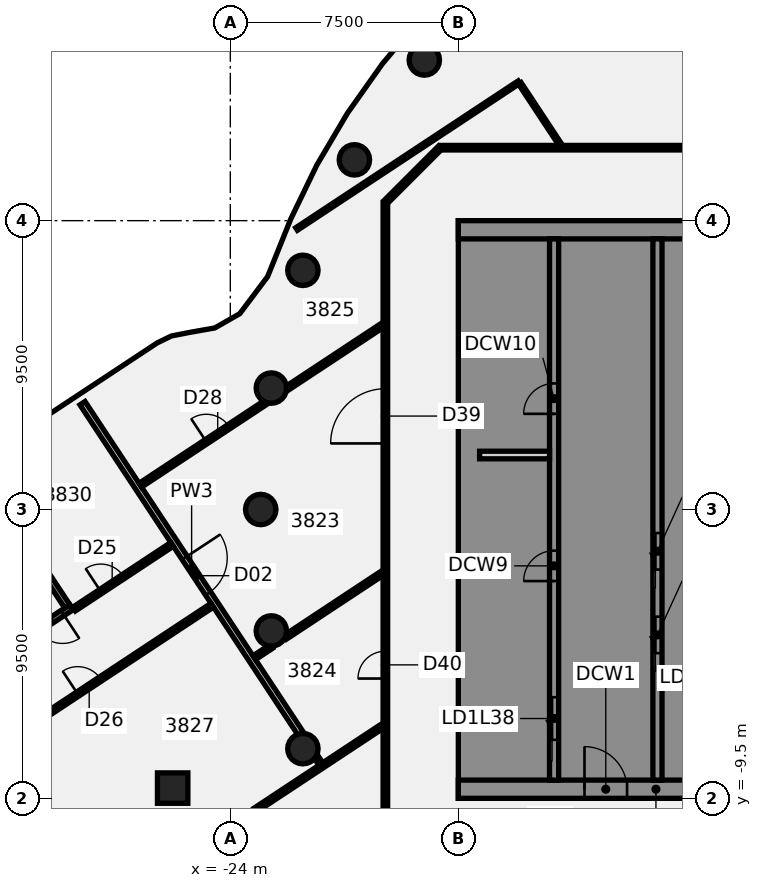
"""IFC4 building model, lengths in metres.
Left out: names, types, materials, properties, quantities, classifications, styles, units other than length and angle.
Written with IfcOpenShell. Run it as: python <this file> out.ifc"""

import sys

from ifc_helpers import new_model, si_unit, direction, frame, frame_2d, origin, origin_2d, place, context, subcontext, project, spatial, polyline, rectangle, circle, outline, extrude, element, fill, save


model = new_model("IFC4")
c1 = context("Model", 3, precision=1e-05, world=origin(), true_north=direction((0.0, 1.0)))
c2 = subcontext(c1, "Body", "Model", "MODEL_VIEW")
j1 = project(units=[si_unit("LENGTHUNIT", "METRE"), si_unit("PLANEANGLEUNIT", "RADIAN")], contexts=[c1])
p1 = place(None, origin())
s1 = spatial("IfcSite", under=j1, at=p1, CompositionType="ELEMENT")
p2 = place(p1, origin())
s2 = spatial("IfcBuilding", under=s1, at=p2, CompositionType="ELEMENT")
p3 = place(p2, frame((0.0, 0.0, 155.5)))
s3 = spatial("IfcBuildingStorey", under=s2, at=p3, CompositionType="ELEMENT", Elevation=155.5)
for number, where, z_axis, x_axis in (
    (1, (-17.619, 14.784, -0.14), (0.0, 0.0, 1.0), (1.0, 0.0, 0.0)),
    (2, (-19.919, 11.5, -0.14), (0.0, 0.0, 1.0), (1.0, 0.0, 0.0)),
    (3, (-21.613, 7.866, -0.14), (0.0, 0.0, 1.0), (1.0, 0.0, 0.0)),
    (4, (-22.651, 3.994, -0.14), (0.0, 0.0, 1.0), (1.0, 0.0, 0.0)),
    (5, (-23.0, 0.0, -0.14), (0.0, 0.0, 1.0), (1.0, 0.0, 0.0)),
    (6, (-22.651, -3.994, -0.14), (0.0, 0.0, 1.0), (1.0, 0.0, 0.0)),
    (7, (-21.613, -7.866, -0.14), (0.0, 0.0, 1.0), (1.0, 0.0, 0.0)),
):
    element("IfcColumn", number, at=place(p3, frame(where, z_axis=z_axis, x_axis=x_axis)), inside=s3, PredefinedType="COLUMN", context=c2, shape_type="SweptSolid", body=[
        extrude(circle(Radius=0.5, at=origin_2d()), origin(), (0.0, 0.0, 1.0), 3.75),
    ])
p4 = place(p3, frame((-25.896, -9.163, -0.139), z_axis=(0.044706213481, -0.018481171221, 0.998829215025), x_axis=(-0.55085630211, 0.833637157717, 0.040080215802)))
e8 = element("IfcColumn", 8, at=p4, inside=s3, PredefinedType="COLUMN", context=c2, shape_type="SweptSolid", body=[
    extrude(rectangle(XDim=1.0, YDim=1.0, at=origin_2d()), origin(), (0.0, 0.0, 1.0), 3.752),
])
p5 = place(p3, frame((-28.862, 3.497, 0.0), z_axis=(0.0, 0.0, 1.0), x_axis=(0.551049471112, -0.834472576174, 0.0)))
e9 = element("IfcWall", 9, at=p5, inside=s3, PredefinedType="PARTITIONING", context=c2, shape_type="SweptSolid", body=[
    extrude(rectangle(XDim=13.029, YDim=0.2, at=frame_2d((6.514, 0.0))), origin(), (0.0, 0.0, 1.0), 3.01),
])
p6 = place(p5, frame((6.099, 0.0, 0.0)))
e10 = element("IfcOpeningElement", 10, at=p6, cuts=e9, PredefinedType="OPENING", context=c2, shape_type="SweptSolid", body=[
    extrude(rectangle(XDim=1.4, YDim=2.1, at=frame_2d((0.7, 1.05))), frame((0.0, 0.11, 0.0), z_axis=(0.0, -1.0, 0.0), x_axis=(1.0, 0.0, 0.0)), (0.0, 0.0, 1.0), 0.22),
])
p7 = place(p3, frame((-21.183, -8.133, 0.0), z_axis=(0.0, 0.0, 1.0), x_axis=(0.550902449234, -0.834569644444, 0.0)))
e11 = element("IfcWall", 11, at=p7, inside=s3, PredefinedType="PARTITIONING", context=c2, shape_type="SweptSolid", body=[
    extrude(rectangle(XDim=0.282, YDim=0.15, at=frame_2d((0.141, 0.0))), origin(), (0.0, 0.0, 1.0), 3.01),
])
p8 = place(p3, frame((-14.477, 14.014, 0.0), z_axis=(0.0, 0.0, 1.0), x_axis=(0.550874353815, -0.834588189653, 0.0)))
e12 = element("IfcWall", 12, at=p8, inside=s3, PredefinedType="PARTITIONING", context=c2, shape_type="SweptSolid", body=[
    extrude(rectangle(XDim=2.434, YDim=0.1, at=frame_2d((1.217, 0.0))), origin(), (0.0, 0.0, 1.0), 3.01),
])
p9 = place(p3, frame((-9.884, 23.177, 0.0), z_axis=(0.0, 0.0, 1.0), x_axis=(0.550963337995, -0.834529448363, 0.0)))
e13 = element("IfcWall", 13, at=p9, inside=s3, PredefinedType="PARTITIONING", context=c2, shape_type="SweptSolid", body=[
    extrude(rectangle(XDim=13.393, YDim=0.15, at=frame_2d((6.697, 0.0))), origin(), (0.0, 0.0, 1.0), 3.01),
])
p10 = place(p3, frame((-17.065, 11.9, 0.0), z_axis=(0.0, 0.0, 1.0), x_axis=(1.0, 0.0, 0.0)))
e14 = element("IfcWall", 14, at=p10, inside=s3, PredefinedType="PARTITIONING", context=c2, shape_type="SweptSolid", body=[
    extrude(rectangle(XDim=34.165, YDim=0.15, at=frame_2d((17.083, 0.0))), origin(), (0.0, 0.0, 1.0), 3.01),
])
p11 = place(p10, frame((22.509, 0.0, 0.0)))
e15 = element("IfcOpeningElement", 15, at=p11, cuts=e14, PredefinedType="OPENING", context=c2, shape_type="SweptSolid", body=[
    extrude(rectangle(XDim=1.8, YDim=2.1, at=frame_2d((0.9, 1.05))), frame((0.0, 0.085, 0.0), z_axis=(0.0, -1.0, 0.0), x_axis=(1.0, 0.0, 0.0)), (0.0, 0.0, 1.0), 0.17),
])
p12 = place(p10, frame((30.477, 0.0, 0.0)))
e16 = element("IfcOpeningElement", 16, at=p12, cuts=e14, PredefinedType="OPENING", context=c2, shape_type="SweptSolid", body=[
    extrude(rectangle(XDim=1.8, YDim=2.1, at=frame_2d((0.9, 1.05))), frame((0.0, 0.085, 0.0), z_axis=(0.0, -1.0, 0.0), x_axis=(1.0, 0.0, 0.0)), (0.0, 0.0, 1.0), 0.17),
])
p13 = place(p10, frame((8.334, 0.0, 0.0)))
e17 = element("IfcOpeningElement", 17, at=p13, cuts=e14, PredefinedType="OPENING", context=c2, shape_type="SweptSolid", body=[
    extrude(rectangle(XDim=1.8, YDim=2.1, at=frame_2d((0.9, 1.05))), frame((0.0, 0.085, 0.0), z_axis=(0.0, -1.0, 0.0), x_axis=(1.0, 0.0, 0.0)), (0.0, 0.0, 1.0), 0.17),
])
p14 = place(p3, frame((-29.137, -3.274, 0.0), z_axis=(0.0, 0.0, 1.0), x_axis=(0.834522761969, 0.550973465563, 0.0)))
e18 = element("IfcWall", 18, at=p14, inside=s3, PredefinedType="PARTITIONING", context=c2, shape_type="SweptSolid", body=[
    extrude(rectangle(XDim=3.861, YDim=0.15, at=frame_2d((1.93, 0.0))), origin(), (0.0, 0.0, 1.0), 3.01),
])
p15 = place(p14, frame((1.05, 0.0, 0.0)))
e19 = element("IfcOpeningElement", 19, at=p15, cuts=e18, PredefinedType="OPENING", context=c2, shape_type="SweptSolid", body=[
    extrude(rectangle(XDim=0.9, YDim=2.1, at=frame_2d((0.45, 1.05))), frame((0.0, 0.085, 0.0), z_axis=(0.0, -1.0, 0.0), x_axis=(1.0, 0.0, 0.0)), (0.0, 0.0, 1.0), 0.17),
])
p16 = place(p3, frame((-39.464, -12.969, 0.0), z_axis=(0.0, 0.0, 1.0), x_axis=(0.834428590681, 0.551116074029, 0.0)))
e20 = element("IfcWall", 20, at=p16, inside=s3, PredefinedType="PARTITIONING", context=c2, shape_type="SweptSolid", body=[
    extrude(rectangle(XDim=17.82, YDim=0.15, at=frame_2d((8.91, 0.0))), origin(), (0.0, 0.0, 1.0), 3.01),
])
p17 = place(p16, frame((12.52, 0.0, 0.0)))
e21 = element("IfcOpeningElement", 21, at=p17, cuts=e20, PredefinedType="OPENING", context=c2, shape_type="SweptSolid", body=[
    extrude(rectangle(XDim=0.9, YDim=2.1, at=frame_2d((0.45, 1.05))), frame((0.0, 0.085, 0.0), z_axis=(0.0, -1.0, 0.0), x_axis=(1.0, 0.0, 0.0)), (0.0, 0.0, 1.0), 0.17),
])
p18 = place(p16, frame((1.27, 0.0, 0.0)))
e22 = element("IfcOpeningElement", 22, at=p18, cuts=e20, PredefinedType="OPENING", context=c2, shape_type="SweptSolid", body=[
    extrude(rectangle(XDim=0.9, YDim=2.1, at=frame_2d((0.45, 1.05))), frame((0.0, 0.085, 0.0), z_axis=(0.0, -1.0, 0.0), x_axis=(1.0, 0.0, 0.0)), (0.0, 0.0, 1.0), 0.17),
])
p19 = place(p3, frame((-26.96, 0.799, 0.0), z_axis=(0.0, 0.0, 1.0), x_axis=(0.834519729805, 0.550978058152, 0.0)))
e23 = element("IfcWall", 23, at=p19, inside=s3, PredefinedType="PARTITIONING", context=c2, shape_type="SweptSolid", body=[
    extrude(rectangle(XDim=4.957, YDim=0.15, at=frame_2d((2.479, 0.0))), origin(), (0.0, 0.0, 1.0), 3.01),
])
p20 = place(p19, frame((2.6, 0.0, 0.0)))
e24 = element("IfcOpeningElement", 24, at=p20, cuts=e23, PredefinedType="OPENING", context=c2, shape_type="SweptSolid", body=[
    extrude(rectangle(XDim=0.9, YDim=2.1, at=frame_2d((0.45, 1.05))), frame((0.0, 0.085, 0.0), z_axis=(0.0, -1.0, 0.0), x_axis=(1.0, 0.0, 0.0)), (0.0, 0.0, 1.0), 0.17),
])
p21 = place(p3, frame((-22.145, 3.979, 0.0), z_axis=(0.0, 0.0, 1.0), x_axis=(0.834514075332, 0.550986622409, 0.0)))
e25 = element("IfcWall", 25, at=p21, inside=s3, PredefinedType="PARTITIONING", context=c2, shape_type="SweptSolid", body=[
    extrude(rectangle(XDim=3.768, YDim=0.15, at=frame_2d((1.884, 0.0))), origin(), (0.0, 0.0, 1.0), 3.01),
])
p22 = place(p3, frame((-23.21, -4.873, 0.0), z_axis=(0.0, 0.0, 1.0), x_axis=(0.834729938558, 0.550659540619, 0.0)))
e26 = element("IfcWall", 26, at=p22, inside=s3, PredefinedType="PARTITIONING", context=c2, shape_type="SweptSolid", body=[
    extrude(rectangle(XDim=0.67, YDim=0.15, at=frame_2d((0.335, 0.0))), origin(), (0.0, 0.0, 1.0), 3.01),
])
p23 = place(p3, frame((-22.197, -4.204, 0.0), z_axis=(0.0, 0.0, 1.0), x_axis=(0.834493361806, 0.551017993446, 0.0)))
e27 = element("IfcWall", 27, at=p23, inside=s3, PredefinedType="PARTITIONING", context=c2, shape_type="SweptSolid", body=[
    extrude(rectangle(XDim=3.831, YDim=0.15, at=frame_2d((1.916, 0.0))), origin(), (0.0, 0.0, 1.0), 3.01),
])
p24 = place(p3, frame((-23.177, -9.884, 0.0), z_axis=(0.0, 0.0, 1.0), x_axis=(0.834495924201, 0.551014112788, 0.0)))
e28 = element("IfcWall", 28, at=p24, inside=s3, PredefinedType="PARTITIONING", context=c2, shape_type="SweptSolid", body=[
    extrude(rectangle(XDim=5.005, YDim=0.15, at=frame_2d((2.503, 0.0))), origin(), (0.0, 0.0, 1.0), 3.01),
])
p25 = place(p3, frame((-21.82, 9.226, 0.0), z_axis=(0.0, 0.0, 1.0), x_axis=(0.83453104674, 0.550960916969, 0.0)))
e29 = element("IfcWall", 29, at=p25, inside=s3, PredefinedType="PARTITIONING", context=c2, shape_type="SweptSolid", body=[
    extrude(rectangle(XDim=8.767, YDim=0.1, at=frame_2d((4.384, 0.0))), origin(), (0.0, 0.0, 1.0), 3.01),
])
p26 = place(p3, frame((-18.872, 10.128, 0.0), z_axis=(0.0, 0.0, 1.0), x_axis=(0.707106781187, 0.707106781187, 0.0)))
e30 = element("IfcWall", 30, at=p26, inside=s3, PredefinedType="PARTITIONING", context=c2, shape_type="SweptSolid", body=[
    extrude(rectangle(XDim=2.505, YDim=0.15, at=frame_2d((1.253, 0.0))), origin(), (0.0, 0.0, 1.0), 3.01),
])
p27 = place(p3, frame((-18.9, -10.1, 0.0), z_axis=(0.0, 0.0, 1.0), x_axis=(0.0, 1.0, 0.0)))
e31 = element("IfcWall", 31, at=p27, inside=s3, PredefinedType="PARTITIONING", context=c2, shape_type="SweptSolid", body=[
    extrude(rectangle(XDim=20.2, YDim=0.15, at=frame_2d((10.1, 0.0))), origin(), (0.0, 0.0, 1.0), 3.01),
])
p28 = place(p27, frame((12.273, 0.0, 0.0)))
e32 = element("IfcOpeningElement", 32, at=p28, cuts=e31, PredefinedType="OPENING", context=c2, shape_type="SweptSolid", body=[
    extrude(rectangle(XDim=1.8, YDim=2.1, at=frame_2d((0.9, 1.05))), frame((0.0, 0.085, 0.0), z_axis=(0.0, -1.0, 0.0), x_axis=(1.0, 0.0, 0.0)), (0.0, 0.0, 1.0), 0.17),
])
p29 = place(p27, frame((4.54, 0.0, 0.0)))
e33 = element("IfcOpeningElement", 33, at=p29, cuts=e31, PredefinedType="OPENING", context=c2, shape_type="SweptSolid", body=[
    extrude(rectangle(XDim=0.9, YDim=2.1, at=frame_2d((0.45, 1.05))), frame((0.0, 0.085, 0.0), z_axis=(0.0, -1.0, 0.0), x_axis=(1.0, 0.0, 0.0)), (0.0, 0.0, 1.0), 0.17),
])
p30 = place(p3, frame((-16.5, -9.2, 0.0), z_axis=(0.0, 0.0, 1.0), x_axis=(1.0, 0.0, 0.0)))
e34 = element("IfcWall", 34, at=p30, inside=s3, PredefinedType="SHEAR", context=c2, shape_type="SweptSolid", body=[
    extrude(rectangle(XDim=13.0, YDim=0.6, at=frame_2d((6.5, 0.0))), origin(), (0.0, 0.0, 1.0), 3.61),
])
p31 = place(p30, frame((4.15, 0.0, 0.0)))
e35 = element("IfcOpeningElement", 35, at=p31, cuts=e34, PredefinedType="OPENING", context=c2, shape_type="SweptSolid", body=[
    extrude(rectangle(XDim=1.4, YDim=2.1, at=frame_2d((0.7, 1.05))), frame((0.0, 0.31, 0.0), z_axis=(0.0, -1.0, 0.0), x_axis=(1.0, 0.0, 0.0)), (0.0, 0.0, 1.0), 0.62),
])
p32 = place(p30, frame((10.125, 0.0, 0.0)))
e36 = element("IfcOpeningElement", 36, at=p32, cuts=e34, PredefinedType="OPENING", context=c2, shape_type="SweptSolid", body=[
    extrude(rectangle(XDim=1.4, YDim=2.1, at=frame_2d((0.7, 1.05))), frame((0.0, 0.31, 0.0), z_axis=(0.0, -1.0, 0.0), x_axis=(1.0, 0.0, 0.0)), (0.0, 0.0, 1.0), 0.62),
])
p33 = place(p3, origin())
e37 = element("IfcWall", 37, at=p33, inside=s3, PredefinedType="SHEAR", context=c2, shape_type="SweptSolid", body=[
    extrude(outline(polyline([(-13.5, -8.125), (-15.9, -8.125), (-15.9, -5.625), (-13.5, -5.625), (-13.5, -5.375), (-15.9, -5.375), (-15.9, 5.375), (-13.5, 5.375), (-13.5, 5.625), (-15.9, 5.625), (-15.9, 8.125), (-13.5, 8.125), (-13.5, 8.9), (-15.9, 8.9), (-16.5, 8.9), (-16.5, -8.9), (-15.9, -8.9), (-13.5, -8.9), (-13.5, -8.125)])), origin(), (0.0, 0.0, 1.0), 3.61),
])
p34 = place(p3, frame((-16.5, 9.2, 0.0), z_axis=(0.0, 0.0, 1.0), x_axis=(1.0, 0.0, 0.0)))
e38 = element("IfcWall", 38, at=p34, inside=s3, PredefinedType="SHEAR", context=c2, shape_type="SweptSolid", body=[
    extrude(rectangle(XDim=13.0, YDim=0.6, at=frame_2d((6.5, 0.0))), origin(), (0.0, 0.0, 1.0), 3.61),
])
p35 = place(p3, origin())
e39 = element("IfcWall", 39, at=p35, inside=s3, PredefinedType="SHEAR", context=c2, shape_type="SweptSolid", body=[
    extrude(outline(polyline([(-9.8, -5.375), (-9.8, -5.625), (-7.5, -5.625), (-7.2, -5.625), (-7.2, 8.9), (-7.5, 8.9), (-9.8, 8.9), (-9.8, 8.125), (-7.5, 8.125), (-7.5, 5.625), (-9.8, 5.625), (-9.8, 5.375), (-7.5, 5.375), (-7.5, 2.875), (-9.8, 2.875), (-9.8, 2.625), (-7.5, 2.625), (-7.5, 0.125), (-9.8, 0.125), (-9.8, -0.125), (-7.5, -0.125), (-7.5, -2.625), (-9.8, -2.625), (-9.8, -2.875), (-7.5, -2.875), (-7.5, -5.375), (-9.8, -5.375)])), origin(), (0.0, 0.0, 1.0), 3.61),
])
p36 = place(p3, origin())
e40 = element("IfcWall", 40, at=p36, inside=s3, PredefinedType="SHEAR", context=c2, shape_type="SweptSolid", body=[
    extrude(outline(polyline([(-7.5, -8.125), (-9.55, -8.125), (-9.55, -5.625), (-9.8, -5.625), (-9.8, -8.125), (-9.8, -8.9), (-7.5, -8.9), (-7.5, -8.125)])), origin(), (0.0, 0.0, 1.0), 3.61),
])
p37 = place(p3, frame((-13.35, -8.9, 0.0), z_axis=(0.0, 0.0, 1.0), x_axis=(0.0, 1.0, 0.0)))
e41 = element("IfcWall", 41, at=p37, inside=s3, PredefinedType="SHEAR", context=c2, shape_type="SweptSolid", body=[
    extrude(rectangle(XDim=17.8, YDim=0.3, at=frame_2d((8.9, 0.0))), origin(), (0.0, 0.0, 1.0), 3.61),
])
p38 = place(p37, frame((1.325, 0.0, 0.0)))
e42 = element("IfcOpeningElement", 42, at=p38, cuts=e41, PredefinedType="OPENING", context=c2, shape_type="SweptSolid", body=[
    extrude(rectangle(XDim=1.4, YDim=2.1, at=frame_2d((0.7, 1.05))), frame((0.0, 0.16, 0.0), z_axis=(0.0, -1.0, 0.0), x_axis=(1.0, 0.0, 0.0)), (0.0, 0.0, 1.0), 0.32),
])
p39 = place(p37, frame((6.546, 0.0, 0.0)))
e43 = element("IfcOpeningElement", 43, at=p39, cuts=e41, PredefinedType="OPENING", context=c2, shape_type="SweptSolid", body=[
    extrude(rectangle(XDim=1.0, YDim=2.1, at=frame_2d((0.5, 1.05))), frame((0.0, 0.16, 0.0), z_axis=(0.0, -1.0, 0.0), x_axis=(1.0, 0.0, 0.0)), (0.0, 0.0, 1.0), 0.32),
])
p40 = place(p37, frame((12.046, 0.0, 0.0)))
e44 = element("IfcOpeningElement", 44, at=p40, cuts=e41, PredefinedType="OPENING", context=c2, shape_type="SweptSolid", body=[
    extrude(rectangle(XDim=1.0, YDim=2.1, at=frame_2d((0.5, 1.05))), frame((0.0, 0.16, 0.0), z_axis=(0.0, -1.0, 0.0), x_axis=(1.0, 0.0, 0.0)), (0.0, 0.0, 1.0), 0.32),
])
p41 = place(p3, frame((-9.95, -8.9, 0.0), z_axis=(0.0, 0.0, 1.0), x_axis=(0.0, 1.0, 0.0)))
e45 = element("IfcWall", 45, at=p41, inside=s3, PredefinedType="SHEAR", context=c2, shape_type="SweptSolid", body=[
    extrude(rectangle(XDim=17.8, YDim=0.3, at=frame_2d((8.9, 0.0))), origin(), (0.0, 0.0, 1.0), 3.61),
])
p42 = place(p41, frame((4.175, 0.0, 0.0)))
e46 = element("IfcOpeningElement", 46, at=p42, cuts=e45, PredefinedType="OPENING", context=c2, shape_type="SweptSolid", body=[
    extrude(rectangle(XDim=1.2, YDim=2.1, at=frame_2d((0.6, 1.05))), frame((0.0, 0.16, 0.0), z_axis=(0.0, -1.0, 0.0), x_axis=(1.0, 0.0, 0.0)), (0.0, 0.0, 1.0), 0.32),
])
p43 = place(p41, frame((6.925, 0.0, 0.0)))
e47 = element("IfcOpeningElement", 47, at=p43, cuts=e45, PredefinedType="OPENING", context=c2, shape_type="SweptSolid", body=[
    extrude(rectangle(XDim=1.2, YDim=2.1, at=frame_2d((0.6, 1.05))), frame((0.0, 0.16, 0.0), z_axis=(0.0, -1.0, 0.0), x_axis=(1.0, 0.0, 0.0)), (0.0, 0.0, 1.0), 0.32),
])
p44 = place(p3, frame((-15.8, 1.792, 0.0), z_axis=(0.0, 0.0, 1.0), x_axis=(1.0, 0.0, 0.0)))
e48 = element("IfcWall", 48, at=p44, inside=s3, PredefinedType="PARTITIONING", context=c2, shape_type="SweptSolid", body=[
    extrude(rectangle(XDim=2.3, YDim=0.25, at=frame_2d((1.15, 0.0))), origin(), (0.0, 0.0, 1.0), 3.61),
])
p45 = place(p3, frame((-29.226, -3.213, -0.14), z_axis=(0.0, 0.0, 1.0), x_axis=(-0.834514241837, -0.550986370222, 0.0)))
e49 = element("IfcWall", 49, at=p45, inside=s3, PredefinedType="SHEAR", context=c2, shape_type="SweptSolid", body=[
    extrude(rectangle(XDim=6.7, YDim=0.2, at=frame_2d((3.35, 0.0))), origin(), (0.0, 0.0, 1.0), 3.15),
])
p46 = place(p45, frame((0.35, 0.0, 0.0)))
e50 = element("IfcOpeningElement", 50, at=p46, cuts=e49, PredefinedType="OPENING", context=c2, shape_type="SweptSolid", body=[
    extrude(rectangle(XDim=1.0, YDim=2.1, at=frame_2d((0.5, 1.05))), frame((0.0, 0.11, 0.0), z_axis=(0.0, -1.0, 0.0), x_axis=(1.0, 0.0, 0.0)), (0.0, 0.0, 1.0), 0.22),
])
p47 = place(p3, frame((-31.127, -0.514, -0.14), z_axis=(0.0, 0.0, 1.0), x_axis=(0.550997380847, -0.83450697199, 0.0)))
e51 = element("IfcWall", 51, at=p47, inside=s3, PredefinedType="SHEAR", context=c2, shape_type="SweptSolid", body=[
    extrude(rectangle(XDim=3.2, YDim=0.2, at=frame_2d((1.6, 0.0))), origin(), (0.0, 0.0, 1.0), 3.15),
])
p48 = place(p6, origin())
e52 = element("IfcDoor", 52, at=p48, inside=s3, OperationType="DOUBLE_DOOR_SINGLE_SWING", PredefinedType="DOOR", context=c2, shape_type="SweptSolid", body=[
    extrude(rectangle(XDim=1.4, YDim=2.1, at=frame_2d((0.7, 1.05))), frame((0.0, 0.025, 0.0), z_axis=(0.0, -1.0, 0.0), x_axis=(1.0, 0.0, 0.0)), (0.0, 0.0, 1.0), 0.05),
])
fill(e10, e52)
p49 = place(p15, origin())
e53 = element("IfcDoor", 53, at=p49, inside=s3, OperationType="SINGLE_SWING_RIGHT", PredefinedType="DOOR", context=c2, shape_type="SweptSolid", body=[
    extrude(rectangle(XDim=0.9, YDim=2.1, at=frame_2d((0.45, 1.05))), frame((0.0, 0.025, 0.0), z_axis=(0.0, -1.0, 0.0), x_axis=(1.0, 0.0, 0.0)), (0.0, 0.0, 1.0), 0.05),
])
fill(e19, e53)
p50 = place(p17, frame((0.9, 0.0, 0.0), z_axis=(0.0, 0.0, 1.0), x_axis=(-1.0, 0.0, 0.0)))
e54 = element("IfcDoor", 54, at=p50, inside=s3, OperationType="SINGLE_SWING_RIGHT", PredefinedType="DOOR", context=c2, shape_type="SweptSolid", body=[
    extrude(rectangle(XDim=0.9, YDim=2.1, at=frame_2d((0.45, 1.05))), frame((0.0, 0.025, 0.0), z_axis=(0.0, -1.0, 0.0), x_axis=(1.0, 0.0, 0.0)), (0.0, 0.0, 1.0), 0.05),
])
fill(e21, e54)
p51 = place(p20, origin())
e55 = element("IfcDoor", 55, at=p51, inside=s3, OperationType="SINGLE_SWING_LEFT", PredefinedType="DOOR", context=c2, shape_type="SweptSolid", body=[
    extrude(rectangle(XDim=0.9, YDim=2.1, at=frame_2d((0.45, 1.05))), frame((0.0, 0.025, 0.0), z_axis=(0.0, -1.0, 0.0), x_axis=(1.0, 0.0, 0.0)), (0.0, 0.0, 1.0), 0.05),
])
fill(e24, e55)
p52 = place(p28, frame((1.8, 0.0, 0.0), z_axis=(0.0, 0.0, 1.0), x_axis=(-1.0, 0.0, 0.0)))
e56 = element("IfcDoor", 56, at=p52, inside=s3, OperationType="DOUBLE_DOOR_SINGLE_SWING", PredefinedType="DOOR", context=c2, shape_type="SweptSolid", body=[
    extrude(rectangle(XDim=1.8, YDim=2.1, at=frame_2d((0.9, 1.05))), frame((0.0, 0.025, 0.0), z_axis=(0.0, -1.0, 0.0), x_axis=(1.0, 0.0, 0.0)), (0.0, 0.0, 1.0), 0.05),
])
fill(e32, e56)
p53 = place(p29, origin())
e57 = element("IfcDoor", 57, at=p53, inside=s3, OperationType="SINGLE_SWING_RIGHT", PredefinedType="DOOR", context=c2, shape_type="SweptSolid", body=[
    extrude(rectangle(XDim=0.9, YDim=2.1, at=frame_2d((0.45, 1.05))), frame((0.0, 0.025, 0.0), z_axis=(0.0, -1.0, 0.0), x_axis=(1.0, 0.0, 0.0)), (0.0, 0.0, 1.0), 0.05),
])
fill(e33, e57)
p54 = place(p31, origin())
e58 = element("IfcDoor", 58, at=p54, inside=s3, OperationType="SINGLE_SWING_LEFT", PredefinedType="DOOR", context=c2, shape_type="SweptSolid", body=[
    extrude(rectangle(XDim=1.4, YDim=2.1, at=frame_2d((0.7, 1.05))), frame((0.0, 0.025, 0.0), z_axis=(0.0, -1.0, 0.0), x_axis=(1.0, 0.0, 0.0)), (0.0, 0.0, 1.0), 0.05),
])
fill(e35, e58)
p55 = place(p38, origin())
e59 = element("IfcDoor", 59, at=p55, inside=s3, OperationType="SLIDING_TO_LEFT", PredefinedType="DOOR", context=c2, shape_type="SweptSolid", body=[
    extrude(rectangle(XDim=1.4, YDim=2.1, at=frame_2d((0.7, 1.05))), frame((0.0, 0.025, 0.0), z_axis=(0.0, -1.0, 0.0), x_axis=(1.0, 0.0, 0.0)), (0.0, 0.0, 1.0), 0.05),
])
fill(e42, e59)
p56 = place(p42, origin())
e60 = element("IfcDoor", 60, at=p56, inside=s3, OperationType="SLIDING_TO_LEFT", PredefinedType="DOOR", context=c2, shape_type="SweptSolid", body=[
    extrude(rectangle(XDim=1.2, YDim=2.1, at=frame_2d((0.6, 1.05))), frame((0.0, 0.025, 0.0), z_axis=(0.0, -1.0, 0.0), x_axis=(1.0, 0.0, 0.0)), (0.0, 0.0, 1.0), 0.05),
])
fill(e46, e60)
p57 = place(p43, origin())
e61 = element("IfcDoor", 61, at=p57, inside=s3, OperationType="SLIDING_TO_LEFT", PredefinedType="DOOR", context=c2, shape_type="SweptSolid", body=[
    extrude(rectangle(XDim=1.2, YDim=2.1, at=frame_2d((0.6, 1.05))), frame((0.0, 0.025, 0.0), z_axis=(0.0, -1.0, 0.0), x_axis=(1.0, 0.0, 0.0)), (0.0, 0.0, 1.0), 0.05),
])
fill(e47, e61)
p58 = place(p39, origin())
e62 = element("IfcDoor", 62, at=p58, inside=s3, OperationType="SINGLE_SWING_LEFT", PredefinedType="DOOR", context=c2, shape_type="SweptSolid", body=[
    extrude(rectangle(XDim=1.0, YDim=2.1, at=frame_2d((0.5, 1.05))), frame((0.0, 0.025, 0.0), z_axis=(0.0, -1.0, 0.0), x_axis=(1.0, 0.0, 0.0)), (0.0, 0.0, 1.0), 0.05),
])
fill(e43, e62)
p59 = place(p40, origin())
e63 = element("IfcDoor", 63, at=p59, inside=s3, OperationType="SINGLE_SWING_LEFT", PredefinedType="DOOR", context=c2, shape_type="SweptSolid", body=[
    extrude(rectangle(XDim=1.0, YDim=2.1, at=frame_2d((0.5, 1.05))), frame((0.0, 0.025, 0.0), z_axis=(0.0, -1.0, 0.0), x_axis=(1.0, 0.0, 0.0)), (0.0, 0.0, 1.0), 0.05),
])
fill(e44, e63)
p60 = place(p46, origin())
e64 = element("IfcDoor", 64, at=p60, inside=s3, OperationType="SINGLE_SWING_LEFT", PredefinedType="DOOR", context=c2, shape_type="SweptSolid", body=[
    extrude(rectangle(XDim=1.0, YDim=2.1, at=frame_2d((0.5, 1.05))), frame((0.0, 0.025, 0.0), z_axis=(0.0, -1.0, 0.0), x_axis=(1.0, 0.0, 0.0)), (0.0, 0.0, 1.0), 0.05),
])
fill(e50, e64)
save(model, sys.argv[1])
